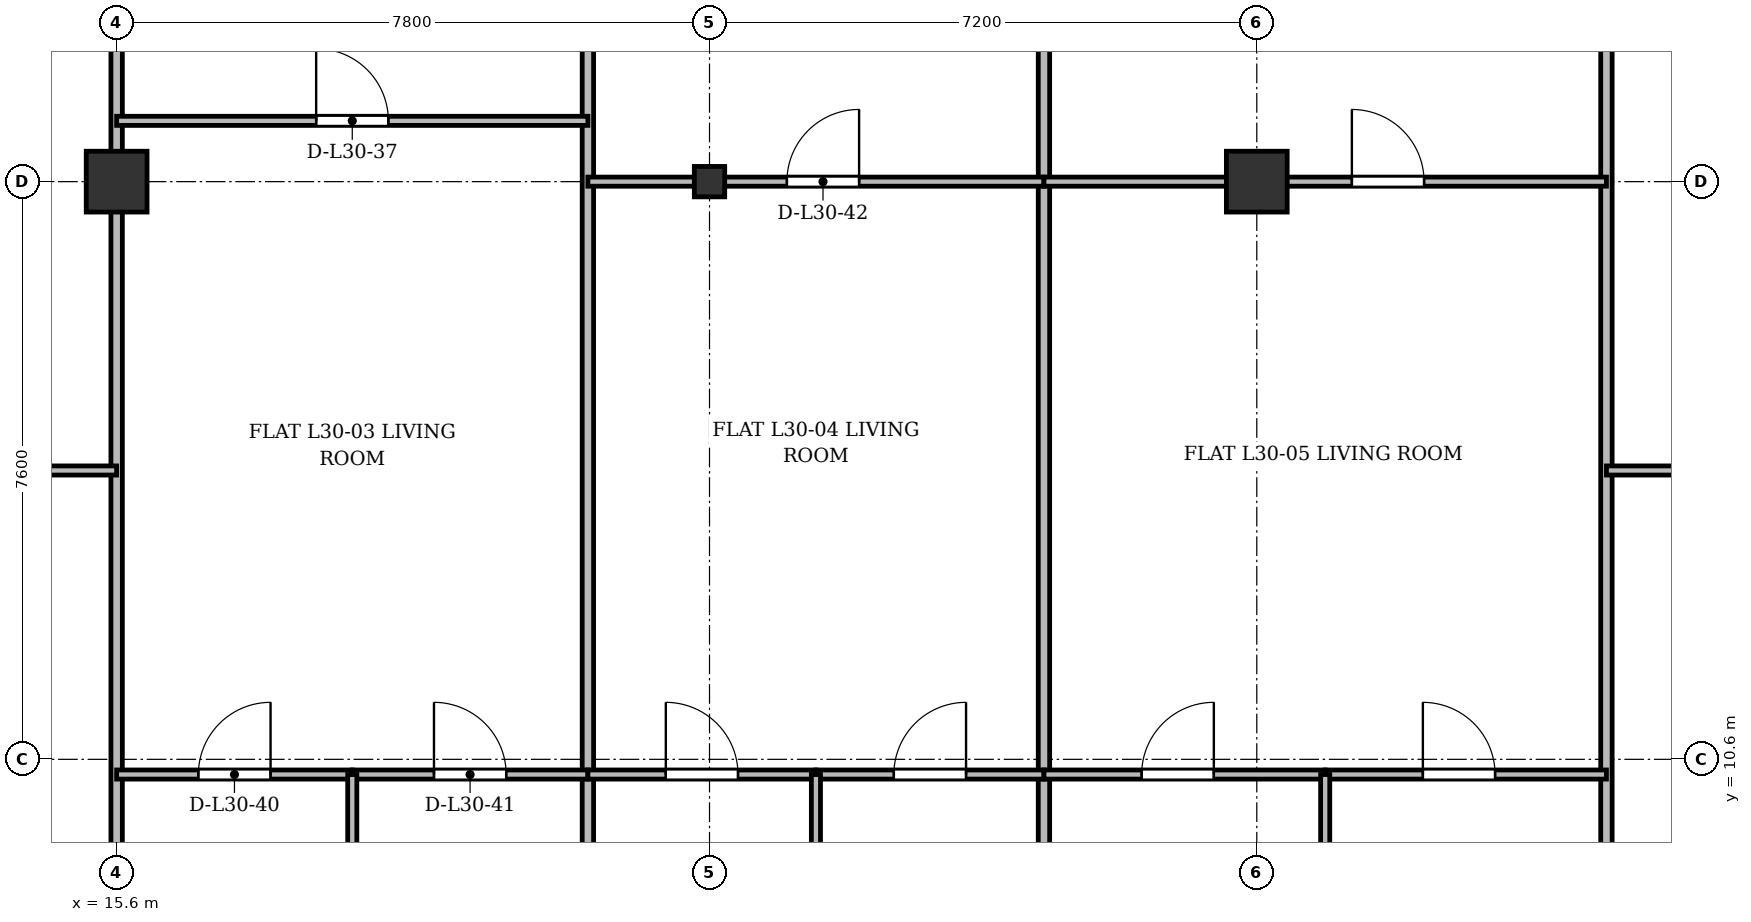
"""IFC4 building model, lengths in metres.
Left out: names, types, materials, properties, quantities, classifications, styles, units other than length and angle.
Written with IfcOpenShell. Run it as: python <this file> out.ifc"""

import sys

from ifc_helpers import new_model, si_unit, direction, frame, frame_2d, origin, origin_2d, place, context, subcontext, project, spatial, rectangle, i_section, extrude, source, transform, mapped, element, fill, save


model = new_model("IFC4")
c1 = context("Model", 3, precision=1e-05, world=origin(), true_north=direction((0.0, 1.0)))
c2 = subcontext(c1, "Body", "Model", "MODEL_VIEW")
j1 = project(units=[si_unit("LENGTHUNIT", "METRE"), si_unit("PLANEANGLEUNIT", "RADIAN")], contexts=[c1])
p1 = place(None, origin())
s1 = spatial("IfcSite", under=j1, at=p1, CompositionType="ELEMENT")
p2 = place(p1, origin())
s2 = spatial("IfcBuilding", under=s1, at=p2, CompositionType="ELEMENT")
p3 = place(p2, frame((0.0, 0.0, 117.7)))
s3 = spatial("IfcBuildingStorey", under=s2, at=p3, CompositionType="ELEMENT", Elevation=117.7)
m1 = source(origin(), c2, "Body", "SweptSolid", [
    extrude(rectangle(XDim=0.8, YDim=0.8, at=origin_2d()), origin(), (0.0, 0.0, 1.0), 3.6),
])
p4 = place(p3, frame((15.6, 18.2, 0.0), z_axis=(0.0, 0.0, 1.0), x_axis=(1.0, 0.0, 0.0)))
e1 = element("IfcColumn", 1, at=p4, inside=s3, PredefinedType="COLUMN", context=c2, shape_type="MappedRepresentation", body=[
    mapped(m1, transform((0.0, 0.0, 0.0), x_axis=(1.0, 0.0, 0.0), y_axis=(0.0, 1.0, 0.0), z_axis=(0.0, 0.0, 1.0), scale=1.0)),
])
m2 = source(origin(), c2, "Body", "SweptSolid", [
    extrude(i_section(OverallWidth=0.4, OverallDepth=0.4, WebThickness=0.022, FlangeThickness=0.035, at=origin_2d()), origin(), (0.0, 0.0, 1.0), 3.6),
])
p5 = place(p3, frame((23.4, 18.2, 0.0), z_axis=(0.0, 0.0, 1.0), x_axis=(1.0, 0.0, 0.0)))
e2 = element("IfcColumn", 2, at=p5, inside=s3, PredefinedType="COLUMN", context=c2, shape_type="MappedRepresentation", body=[
    mapped(m2, transform((0.0, 0.0, 0.0), x_axis=(1.0, 0.0, 0.0), y_axis=(0.0, 1.0, 0.0), z_axis=(0.0, 0.0, 1.0), scale=1.0)),
])
p6 = place(p3, frame((30.6, 18.2, 0.0), z_axis=(0.0, 0.0, 1.0), x_axis=(1.0, 0.0, 0.0)))
e3 = element("IfcColumn", 3, at=p6, inside=s3, PredefinedType="COLUMN", context=c2, shape_type="MappedRepresentation", body=[
    mapped(m1, transform((0.0, 0.0, 0.0), x_axis=(1.0, 0.0, 0.0), y_axis=(0.0, 1.0, 0.0), z_axis=(0.0, 0.0, 1.0), scale=1.0)),
])
p7 = place(p3, frame((15.6, 3.145, 0.0), z_axis=(0.0, 0.0, 1.0), x_axis=(0.0, 1.0, 0.0)))
e4 = element("IfcWall", 4, at=p7, inside=s3, PredefinedType="PARTITIONING", context=c2, shape_type="SweptSolid", body=[
    extrude(rectangle(XDim=24.455, YDim=0.15, at=frame_2d((12.228, 0.0))), origin(), (0.0, 0.0, 1.0), 2.84),
])
for number, where, z_axis, x_axis in (
    (5, (21.8, 3.145, 0.0), (0.0, 0.0, 1.0), (0.0, 1.0, 0.0)),
    (6, (27.8, 3.145, 0.0), (0.0, 0.0, 1.0), (0.0, 1.0, 0.0)),
    (7, (35.2, 3.145, 0.0), (0.0, 0.0, 1.0), (0.0, 1.0, 0.0)),
):
    element("IfcWall", number, at=place(p3, frame(where, z_axis=z_axis, x_axis=x_axis)), inside=s3, PredefinedType="PARTITIONING", context=c2, shape_type="SweptSolid", body=[
        extrude(rectangle(XDim=24.455, YDim=0.15, at=frame_2d((12.228, 0.0))), origin(), (0.0, 0.0, 1.0), 2.752),
    ])
p8 = place(p3, frame((10.2, 14.4, 0.0), z_axis=(0.0, 0.0, 1.0), x_axis=(1.0, 0.0, 0.0)))
e8 = element("IfcWall", 8, at=p8, inside=s3, PredefinedType="PARTITIONING", context=c2, shape_type="SweptSolid", body=[
    extrude(rectangle(XDim=5.4, YDim=0.12, at=frame_2d((2.7, 0.0))), origin(), (0.0, 0.0, 1.0), 2.84),
])
p9 = place(p8, frame((2.225, 0.0, 0.0)))
e9 = element("IfcOpeningElement", 9, at=p9, cuts=e8, PredefinedType="OPENING", context=c2, shape_type="SweptSolid", body=[
    extrude(rectangle(XDim=0.95, YDim=2.15, at=frame_2d((0.475, 1.075))), frame((0.0, 0.07, 0.0), z_axis=(0.0, -1.0, 0.0), x_axis=(1.0, 0.0, 0.0)), (0.0, 0.0, 1.0), 0.14),
])
p10 = place(p3, frame((15.6, 19.0, 0.0), z_axis=(0.0, 0.0, 1.0), x_axis=(1.0, 0.0, 0.0)))
e10 = element("IfcWall", 10, at=p10, inside=s3, PredefinedType="PARTITIONING", context=c2, shape_type="SweptSolid", body=[
    extrude(rectangle(XDim=6.2, YDim=0.12, at=frame_2d((3.1, 0.0))), origin(), (0.0, 0.0, 1.0), 2.84),
])
p11 = place(p10, frame((2.625, 0.0, 0.0)))
e11 = element("IfcOpeningElement", 11, at=p11, cuts=e10, PredefinedType="OPENING", context=c2, shape_type="SweptSolid", body=[
    extrude(rectangle(XDim=0.95, YDim=2.15, at=frame_2d((0.475, 1.075))), frame((0.0, 0.07, 0.0), z_axis=(0.0, -1.0, 0.0), x_axis=(1.0, 0.0, 0.0)), (0.0, 0.0, 1.0), 0.14),
])
p12 = place(p3, frame((15.6, 10.4, 0.0), z_axis=(0.0, 0.0, 1.0), x_axis=(1.0, 0.0, 0.0)))
e12 = element("IfcWall", 12, at=p12, inside=s3, PredefinedType="PARTITIONING", context=c2, shape_type="SweptSolid", body=[
    extrude(rectangle(XDim=3.1, YDim=0.12, at=frame_2d((1.55, 0.0))), origin(), (0.0, 0.0, 1.0), 2.84),
])
p13 = place(p12, frame((1.075, 0.0, 0.0)))
e13 = element("IfcOpeningElement", 13, at=p13, cuts=e12, PredefinedType="OPENING", context=c2, shape_type="SweptSolid", body=[
    extrude(rectangle(XDim=0.95, YDim=2.15, at=frame_2d((0.475, 1.075))), frame((0.0, 0.07, 0.0), z_axis=(0.0, -1.0, 0.0), x_axis=(1.0, 0.0, 0.0)), (0.0, 0.0, 1.0), 0.14),
])
p14 = place(p3, frame((18.7, 10.4, 0.0), z_axis=(0.0, 0.0, 1.0), x_axis=(1.0, 0.0, 0.0)))
e14 = element("IfcWall", 14, at=p14, inside=s3, PredefinedType="PARTITIONING", context=c2, shape_type="SweptSolid", body=[
    extrude(rectangle(XDim=3.1, YDim=0.12, at=frame_2d((1.55, 0.0))), origin(), (0.0, 0.0, 1.0), 3.34),
])
p15 = place(p14, frame((1.075, 0.0, 0.0)))
e15 = element("IfcOpeningElement", 15, at=p15, cuts=e14, PredefinedType="OPENING", context=c2, shape_type="SweptSolid", body=[
    extrude(rectangle(XDim=0.95, YDim=2.15, at=frame_2d((0.475, 1.075))), frame((0.0, 0.07, 0.0), z_axis=(0.0, -1.0, 0.0), x_axis=(1.0, 0.0, 0.0)), (0.0, 0.0, 1.0), 0.14),
])
p16 = place(p3, frame((18.7, 3.145, 0.0), z_axis=(0.0, 0.0, 1.0), x_axis=(0.0, 1.0, 0.0)))
e16 = element("IfcWall", 16, at=p16, inside=s3, PredefinedType="PARTITIONING", context=c2, shape_type="SweptSolid", body=[
    extrude(rectangle(XDim=7.255, YDim=0.12, at=frame_2d((3.627, 0.0))), origin(), (0.0, 0.0, 1.0), 2.752),
])
p17 = place(p3, frame((21.8, 18.2, 0.0), z_axis=(0.0, 0.0, 1.0), x_axis=(1.0, 0.0, 0.0)))
e17 = element("IfcWall", 17, at=p17, inside=s3, PredefinedType="PARTITIONING", context=c2, shape_type="SweptSolid", body=[
    extrude(rectangle(XDim=6.0, YDim=0.12, at=frame_2d((3.0, 0.0))), origin(), (0.0, 0.0, 1.0), 2.752),
])
p18 = place(p17, frame((2.618, 0.0, 0.0)))
e18 = element("IfcOpeningElement", 18, at=p18, cuts=e17, PredefinedType="OPENING", context=c2, shape_type="SweptSolid", body=[
    extrude(rectangle(XDim=0.95, YDim=2.15, at=frame_2d((0.475, 1.075))), frame((0.0, 0.07, 0.0), z_axis=(0.0, -1.0, 0.0), x_axis=(1.0, 0.0, 0.0)), (0.0, 0.0, 1.0), 0.14),
])
p19 = place(p3, frame((21.8, 10.4, 0.0), z_axis=(0.0, 0.0, 1.0), x_axis=(1.0, 0.0, 0.0)))
e19 = element("IfcWall", 19, at=p19, inside=s3, PredefinedType="PARTITIONING", context=c2, shape_type="SweptSolid", body=[
    extrude(rectangle(XDim=3.0, YDim=0.12, at=frame_2d((1.5, 0.0))), origin(), (0.0, 0.0, 1.0), 2.84),
])
p20 = place(p19, frame((1.025, 0.0, 0.0)))
e20 = element("IfcOpeningElement", 20, at=p20, cuts=e19, PredefinedType="OPENING", context=c2, shape_type="SweptSolid", body=[
    extrude(rectangle(XDim=0.95, YDim=2.15, at=frame_2d((0.475, 1.075))), frame((0.0, 0.07, 0.0), z_axis=(0.0, -1.0, 0.0), x_axis=(1.0, 0.0, 0.0)), (0.0, 0.0, 1.0), 0.14),
])
p21 = place(p3, frame((24.8, 10.4, 0.0), z_axis=(0.0, 0.0, 1.0), x_axis=(1.0, 0.0, 0.0)))
e21 = element("IfcWall", 21, at=p21, inside=s3, PredefinedType="PARTITIONING", context=c2, shape_type="SweptSolid", body=[
    extrude(rectangle(XDim=3.0, YDim=0.12, at=frame_2d((1.5, 0.0))), origin(), (0.0, 0.0, 1.0), 3.34),
])
p22 = place(p21, frame((1.025, 0.0, 0.0)))
e22 = element("IfcOpeningElement", 22, at=p22, cuts=e21, PredefinedType="OPENING", context=c2, shape_type="SweptSolid", body=[
    extrude(rectangle(XDim=0.95, YDim=2.15, at=frame_2d((0.475, 1.075))), frame((0.0, 0.07, 0.0), z_axis=(0.0, -1.0, 0.0), x_axis=(1.0, 0.0, 0.0)), (0.0, 0.0, 1.0), 0.14),
])
p23 = place(p3, frame((24.8, 3.145, 0.0), z_axis=(0.0, 0.0, 1.0), x_axis=(0.0, 1.0, 0.0)))
e23 = element("IfcWall", 23, at=p23, inside=s3, PredefinedType="PARTITIONING", context=c2, shape_type="SweptSolid", body=[
    extrude(rectangle(XDim=7.255, YDim=0.12, at=frame_2d((3.627, 0.0))), origin(), (0.0, 0.0, 1.0), 2.752),
])
p24 = place(p3, frame((27.8, 18.2, 0.0), z_axis=(0.0, 0.0, 1.0), x_axis=(1.0, 0.0, 0.0)))
e24 = element("IfcWall", 24, at=p24, inside=s3, PredefinedType="PARTITIONING", context=c2, shape_type="SweptSolid", body=[
    extrude(rectangle(XDim=7.4, YDim=0.12, at=frame_2d((3.7, 0.0))), origin(), (0.0, 0.0, 1.0), 2.752),
])
p25 = place(p24, frame((4.051, 0.0, 0.0)))
e25 = element("IfcOpeningElement", 25, at=p25, cuts=e24, PredefinedType="OPENING", context=c2, shape_type="SweptSolid", body=[
    extrude(rectangle(XDim=0.95, YDim=2.15, at=frame_2d((0.475, 1.075))), frame((0.0, 0.07, 0.0), z_axis=(0.0, -1.0, 0.0), x_axis=(1.0, 0.0, 0.0)), (0.0, 0.0, 1.0), 0.14),
])
p26 = place(p3, frame((27.8, 10.4, 0.0), z_axis=(0.0, 0.0, 1.0), x_axis=(1.0, 0.0, 0.0)))
e26 = element("IfcWall", 26, at=p26, inside=s3, PredefinedType="PARTITIONING", context=c2, shape_type="SweptSolid", body=[
    extrude(rectangle(XDim=3.7, YDim=0.12, at=frame_2d((1.85, 0.0))), origin(), (0.0, 0.0, 1.0), 2.84),
])
p27 = place(p26, frame((1.285, 0.0, 0.0)))
e27 = element("IfcOpeningElement", 27, at=p27, cuts=e26, PredefinedType="OPENING", context=c2, shape_type="SweptSolid", body=[
    extrude(rectangle(XDim=0.95, YDim=2.15, at=frame_2d((0.475, 1.075))), frame((0.0, 0.07, 0.0), z_axis=(0.0, -1.0, 0.0), x_axis=(1.0, 0.0, 0.0)), (0.0, 0.0, 1.0), 0.14),
])
p28 = place(p3, frame((31.5, 10.4, 0.0), z_axis=(0.0, 0.0, 1.0), x_axis=(1.0, 0.0, 0.0)))
e28 = element("IfcWall", 28, at=p28, inside=s3, PredefinedType="PARTITIONING", context=c2, shape_type="SweptSolid", body=[
    extrude(rectangle(XDim=3.7, YDim=0.12, at=frame_2d((1.85, 0.0))), origin(), (0.0, 0.0, 1.0), 3.34),
])
p29 = place(p28, frame((1.285, 0.0, 0.0)))
e29 = element("IfcOpeningElement", 29, at=p29, cuts=e28, PredefinedType="OPENING", context=c2, shape_type="SweptSolid", body=[
    extrude(rectangle(XDim=0.95, YDim=2.15, at=frame_2d((0.475, 1.075))), frame((0.0, 0.07, 0.0), z_axis=(0.0, -1.0, 0.0), x_axis=(1.0, 0.0, 0.0)), (0.0, 0.0, 1.0), 0.14),
])
p30 = place(p3, frame((31.5, 3.145, 0.0), z_axis=(0.0, 0.0, 1.0), x_axis=(0.0, 1.0, 0.0)))
e30 = element("IfcWall", 30, at=p30, inside=s3, PredefinedType="PARTITIONING", context=c2, shape_type="SweptSolid", body=[
    extrude(rectangle(XDim=7.255, YDim=0.12, at=frame_2d((3.627, 0.0))), origin(), (0.0, 0.0, 1.0), 2.752),
])
p31 = place(p3, frame((35.2, 14.4, 0.0), z_axis=(0.0, 0.0, 1.0), x_axis=(1.0, 0.0, 0.0)))
e31 = element("IfcWall", 31, at=p31, inside=s3, PredefinedType="PARTITIONING", context=c2, shape_type="SweptSolid", body=[
    extrude(rectangle(XDim=8.6, YDim=0.12, at=frame_2d((4.3, 0.0))), origin(), (0.0, 0.0, 1.0), 2.84),
])
p32 = place(p31, frame((3.825, 0.0, 0.0)))
e32 = element("IfcOpeningElement", 32, at=p32, cuts=e31, PredefinedType="OPENING", context=c2, shape_type="SweptSolid", body=[
    extrude(rectangle(XDim=0.95, YDim=2.15, at=frame_2d((0.475, 1.075))), frame((0.0, 0.07, 0.0), z_axis=(0.0, -1.0, 0.0), x_axis=(1.0, 0.0, 0.0)), (0.0, 0.0, 1.0), 0.14),
])
m3 = source(origin(), c2, "Body", "SweptSolid", [
    extrude(rectangle(XDim=0.95, YDim=2.15, at=frame_2d((0.475, 1.075))), frame((0.0, 0.025, 0.0), z_axis=(0.0, -1.0, 0.0), x_axis=(1.0, 0.0, 0.0)), (0.0, 0.0, 1.0), 0.05),
])
p33 = place(p11, origin())
e33 = element("IfcDoor", 33, at=p33, inside=s3, OperationType="SINGLE_SWING_LEFT", PredefinedType="DOOR", context=c2, shape_type="MappedRepresentation", body=[
    mapped(m3, transform((0.0, 0.0, 0.0), x_axis=(1.0, 0.0, 0.0), y_axis=(0.0, 1.0, 0.0), z_axis=(0.0, 0.0, 1.0), scale=1.0)),
])
fill(e11, e33)
p34 = place(p13, origin())
e34 = element("IfcDoor", 34, at=p34, inside=s3, OperationType="SINGLE_SWING_RIGHT", PredefinedType="DOOR", context=c2, shape_type="MappedRepresentation", body=[
    mapped(m3, transform((0.0, 0.0, 0.0), x_axis=(1.0, 0.0, 0.0), y_axis=(0.0, 1.0, 0.0), z_axis=(0.0, 0.0, 1.0), scale=1.0)),
])
fill(e13, e34)
p35 = place(p15, origin())
e35 = element("IfcDoor", 35, at=p35, inside=s3, OperationType="SINGLE_SWING_LEFT", PredefinedType="DOOR", context=c2, shape_type="MappedRepresentation", body=[
    mapped(m3, transform((0.0, 0.0, 0.0), x_axis=(1.0, 0.0, 0.0), y_axis=(0.0, 1.0, 0.0), z_axis=(0.0, 0.0, 1.0), scale=1.0)),
])
fill(e15, e35)
p36 = place(p18, origin())
e36 = element("IfcDoor", 36, at=p36, inside=s3, OperationType="SINGLE_SWING_RIGHT", PredefinedType="DOOR", context=c2, shape_type="MappedRepresentation", body=[
    mapped(m3, transform((0.0, 0.0, 0.0), x_axis=(1.0, 0.0, 0.0), y_axis=(0.0, 1.0, 0.0), z_axis=(0.0, 0.0, 1.0), scale=1.0)),
])
fill(e18, e36)
p37 = place(p20, origin())
e37 = element("IfcDoor", 37, at=p37, inside=s3, OperationType="SINGLE_SWING_LEFT", PredefinedType="DOOR", context=c2, shape_type="MappedRepresentation", body=[
    mapped(m3, transform((0.0, 0.0, 0.0), x_axis=(1.0, 0.0, 0.0), y_axis=(0.0, 1.0, 0.0), z_axis=(0.0, 0.0, 1.0), scale=1.0)),
])
fill(e20, e37)
p38 = place(p22, origin())
e38 = element("IfcDoor", 38, at=p38, inside=s3, OperationType="SINGLE_SWING_RIGHT", PredefinedType="DOOR", context=c2, shape_type="MappedRepresentation", body=[
    mapped(m3, transform((0.0, 0.0, 0.0), x_axis=(1.0, 0.0, 0.0), y_axis=(0.0, 1.0, 0.0), z_axis=(0.0, 0.0, 1.0), scale=1.0)),
])
fill(e22, e38)
p39 = place(p25, origin())
e39 = element("IfcDoor", 39, at=p39, inside=s3, OperationType="SINGLE_SWING_LEFT", PredefinedType="DOOR", context=c2, shape_type="MappedRepresentation", body=[
    mapped(m3, transform((0.0, 0.0, 0.0), x_axis=(1.0, 0.0, 0.0), y_axis=(0.0, 1.0, 0.0), z_axis=(0.0, 0.0, 1.0), scale=1.0)),
])
fill(e25, e39)
p40 = place(p27, origin())
e40 = element("IfcDoor", 40, at=p40, inside=s3, OperationType="SINGLE_SWING_RIGHT", PredefinedType="DOOR", context=c2, shape_type="MappedRepresentation", body=[
    mapped(m3, transform((0.0, 0.0, 0.0), x_axis=(1.0, 0.0, 0.0), y_axis=(0.0, 1.0, 0.0), z_axis=(0.0, 0.0, 1.0), scale=1.0)),
])
fill(e27, e40)
p41 = place(p29, origin())
e41 = element("IfcDoor", 41, at=p41, inside=s3, OperationType="SINGLE_SWING_LEFT", PredefinedType="DOOR", context=c2, shape_type="MappedRepresentation", body=[
    mapped(m3, transform((0.0, 0.0, 0.0), x_axis=(1.0, 0.0, 0.0), y_axis=(0.0, 1.0, 0.0), z_axis=(0.0, 0.0, 1.0), scale=1.0)),
])
fill(e29, e41)
save(model, sys.argv[1])
